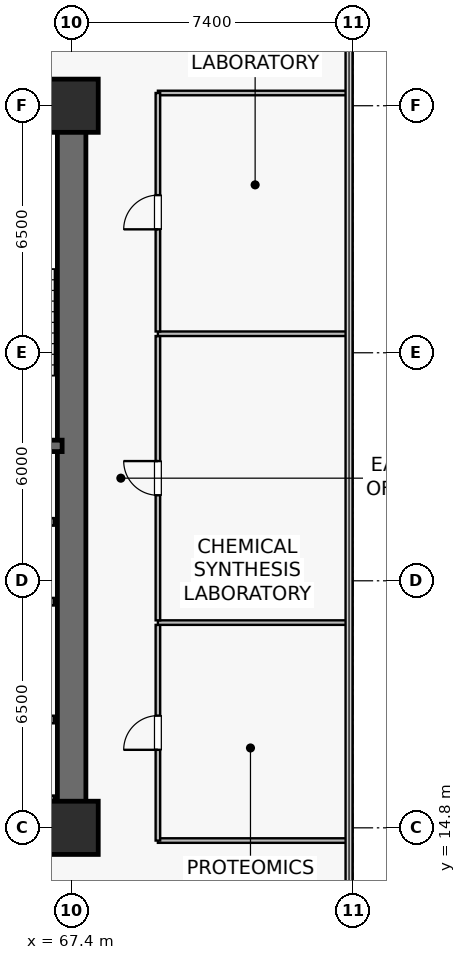
"""IFC4 building model, lengths in metres.
Left out: names, types, materials, properties, quantities, classifications, styles, units other than length and angle.
Written with IfcOpenShell. Run it as: python <this file> out.ifc"""

import sys

from ifc_helpers import new_model, si_unit, direction, frame, frame_2d, origin, origin_2d, place, context, subcontext, project, spatial, rectangle, extrude, source, transform, mapped, element, fill, save


model = new_model("IFC4")
c1 = context("Model", 3, precision=1e-05, world=origin(), true_north=direction((0.0, 1.0)))
c2 = subcontext(c1, "Body", "Model", "MODEL_VIEW")
j1 = project(units=[si_unit("LENGTHUNIT", "METRE"), si_unit("PLANEANGLEUNIT", "RADIAN")], contexts=[c1])
p1 = place(None, origin())
s1 = spatial("IfcSite", under=j1, at=p1, CompositionType="ELEMENT")
p2 = place(p1, origin())
s2 = spatial("IfcBuilding", under=s1, at=p2, CompositionType="ELEMENT")
p3 = place(p2, frame((0.0, 0.0, 86.7)))
s3 = spatial("IfcBuildingStorey", under=s2, at=p3, CompositionType="ELEMENT", Elevation=86.7)
p4 = place(p3, frame((52.225, 14.8, 0.0), z_axis=(0.0, 0.0, 1.0), x_axis=(1.0, 0.0, 0.0)))
e1 = element("IfcWall", 1, at=p4, inside=s3, PredefinedType="SHEAR", context=c2, shape_type="SweptSolid", body=[
    extrude(rectangle(XDim=15.55, YDim=0.75, at=frame_2d((7.775, 0.0))), origin(), (0.0, 0.0, 1.0), 3.78),
])
p5 = place(p3, frame((52.225, 33.8, 0.0), z_axis=(0.0, 0.0, 1.0), x_axis=(1.0, 0.0, 0.0)))
e2 = element("IfcWall", 2, at=p5, inside=s3, PredefinedType="SHEAR", context=c2, shape_type="SweptSolid", body=[
    extrude(rectangle(XDim=15.55, YDim=0.75, at=frame_2d((7.775, 0.0))), origin(), (0.0, 0.0, 1.0), 3.78),
])
p6 = place(p5, frame((6.175, 0.0, 0.0)))
e3 = element("IfcOpeningElement", 3, at=p6, cuts=e2, PredefinedType="OPENING", context=c2, shape_type="SweptSolid", body=[
    extrude(rectangle(XDim=0.95, YDim=2.15, at=frame_2d((0.475, 1.075))), frame((0.0, 0.385, 0.0), z_axis=(0.0, -1.0, 0.0), x_axis=(1.0, 0.0, 0.0)), (0.0, 0.0, 1.0), 0.77),
])
p7 = place(p5, frame((2.635, 0.0, 0.0)))
e4 = element("IfcOpeningElement", 4, at=p7, cuts=e2, PredefinedType="OPENING", context=c2, shape_type="SweptSolid", body=[
    extrude(rectangle(XDim=0.95, YDim=2.15, at=frame_2d((0.475, 1.075))), frame((0.0, 0.385, 0.0), z_axis=(0.0, -1.0, 0.0), x_axis=(1.0, 0.0, 0.0)), (0.0, 0.0, 1.0), 0.77),
])
p8 = place(p3, frame((67.4, 15.175, 0.0), z_axis=(0.0, 0.0, 1.0), x_axis=(0.0, 1.0, 0.0)))
e5 = element("IfcWall", 5, at=p8, inside=s3, PredefinedType="SHEAR", context=c2, shape_type="SweptSolid", body=[
    extrude(rectangle(XDim=18.25, YDim=0.75, at=frame_2d((9.125, 0.0))), origin(), (0.0, 0.0, 1.0), 3.78),
])
p9 = place(p3, frame((63.35, 24.85, 0.0), z_axis=(0.0, 0.0, 1.0), x_axis=(1.0, 0.0, 0.0)))
e6 = element("IfcWall", 6, at=p9, inside=s3, PredefinedType="SHEAR", context=c2, shape_type="SweptSolid", body=[
    extrude(rectangle(XDim=3.8, YDim=0.3, at=frame_2d((1.9, 0.0))), origin(), (0.0, 0.0, 1.0), 3.78),
])
p10 = place(p3, frame((63.35, 33.4, 0.0), z_axis=(0.0, 0.0, 1.0), x_axis=(1.0, 0.0, 0.0)))
e7 = element("IfcWall", 7, at=p10, inside=s3, PredefinedType="SOLIDWALL", context=c2, shape_type="SweptSolid", body=[
    extrude(rectangle(XDim=3.72, YDim=0.12, at=frame_2d((1.86, 0.0))), origin(), (0.0, 0.0, 1.0), 3.78),
])
m1 = source(origin(), c2, "Body", "SweptSolid", [
    extrude(rectangle(XDim=1.4, YDim=1.4, at=origin_2d()), origin(), (0.0, 0.0, 1.0), 4.1),
])
for number, where, z_axis, x_axis in (
    (8, (67.4, 14.8, 0.0), (0.0, 0.0, 1.0), (1.0, 0.0, 0.0)),
    (9, (67.4, 33.8, 0.0), (0.0, 0.0, 1.0), (1.0, 0.0, 0.0)),
):
    element("IfcColumn", number, at=place(p3, frame(where, z_axis=z_axis, x_axis=x_axis)), inside=s3, PredefinedType="COLUMN", context=c2, shape_type="MappedRepresentation", body=[
        mapped(m1, transform((0.0, 0.0, 0.0), scale=1.0)),
    ])
p11 = place(p3, frame((64.67, 17.65, 0.0), z_axis=(0.0, 0.0, 1.0), x_axis=(1.0, 0.0, 0.0)))
e10 = element("IfcWall", 10, at=p11, inside=s3, PredefinedType="SOLIDWALL", context=c2, shape_type="SweptSolid", body=[
    extrude(rectangle(XDim=2.26, YDim=0.2, at=frame_2d((1.13, 0.0))), origin(), (0.0, 0.0, 1.0), 3.78),
])
p12 = place(p11, frame((0.58, 0.0, 0.0)))
e11 = element("IfcOpeningElement", 11, at=p12, cuts=e10, PredefinedType="OPENING", context=c2, shape_type="SweptSolid", body=[
    extrude(rectangle(XDim=1.1, YDim=2.22, at=frame_2d((0.55, 1.11))), frame((0.0, 0.11, 0.0), z_axis=(0.0, -1.0, 0.0), x_axis=(1.0, 0.0, 0.0)), (0.0, 0.0, 1.0), 0.22),
])
for number, where, z_axis, x_axis in (
    (12, (64.67, 15.55, 0.0), (0.0, 0.0, 1.0), (1.0, 0.0, 0.0)),
    (13, (64.67, 20.75, 0.0), (0.0, 0.0, 1.0), (1.0, 0.0, 0.0)),
    (14, (64.67, 22.85, 0.0), (0.0, 0.0, 1.0), (1.0, 0.0, 0.0)),
):
    element("IfcWall", number, at=place(p3, frame(where, z_axis=z_axis, x_axis=x_axis)), inside=s3, PredefinedType="SOLIDWALL", context=c2, shape_type="SweptSolid", body=[
        extrude(rectangle(XDim=2.26, YDim=0.2, at=frame_2d((1.13, 0.0))), origin(), (0.0, 0.0, 1.0), 3.78),
    ])
for number, where, z_axis, x_axis in (
    (15, (69.67, 14.465, 0.0), (0.0, 0.0, 1.0), (1.0, 0.0, 0.0)),
    (16, (69.67, 34.135, 0.0), (0.0, 0.0, 1.0), (1.0, 0.0, 0.0)),
):
    element("IfcWall", number, at=place(p3, frame(where, z_axis=z_axis, x_axis=x_axis)), inside=s3, PredefinedType="PARTITIONING", context=c2, shape_type="SweptSolid", body=[
        extrude(rectangle(XDim=5.02, YDim=0.12, at=frame_2d((2.51, 0.0))), origin(), (0.0, 0.0, 1.0), 3.78),
    ])
p13 = place(p3, frame((69.67, 14.465, 0.0), z_axis=(0.0, 0.0, 1.0), x_axis=(0.0, 1.0, 0.0)))
e17 = element("IfcWall", 17, at=p13, inside=s3, PredefinedType="PARTITIONING", context=c2, shape_type="SweptSolid", body=[
    extrude(rectangle(XDim=5.675, YDim=0.12, at=frame_2d((2.837, 0.0))), origin(), (0.0, 0.0, 1.0), 3.78),
])
p14 = place(p13, frame((2.387, 0.0, 0.0)))
e18 = element("IfcOpeningElement", 18, at=p14, cuts=e17, PredefinedType="OPENING", context=c2, shape_type="SweptSolid", body=[
    extrude(rectangle(XDim=0.9, YDim=2.1, at=frame_2d((0.45, 1.05))), frame((0.0, 0.07, 0.0), z_axis=(0.0, -1.0, 0.0), x_axis=(1.0, 0.0, 0.0)), (0.0, 0.0, 1.0), 0.14),
])
p15 = place(p3, frame((69.67, 20.2, 0.0), z_axis=(0.0, 0.0, 1.0), x_axis=(1.0, 0.0, 0.0)))
e19 = element("IfcWall", 19, at=p15, inside=s3, PredefinedType="PARTITIONING", context=c2, shape_type="SweptSolid", body=[
    extrude(rectangle(XDim=5.02, YDim=0.12, at=frame_2d((2.51, 0.0))), origin(), (0.0, 0.0, 1.0), 3.78),
])
p16 = place(p3, frame((69.67, 20.26, 0.0), z_axis=(0.0, 0.0, 1.0), x_axis=(0.0, 1.0, 0.0)))
e20 = element("IfcWall", 20, at=p16, inside=s3, PredefinedType="PARTITIONING", context=c2, shape_type="SweptSolid", body=[
    extrude(rectangle(XDim=7.48, YDim=0.12, at=frame_2d((3.74, 0.0))), origin(), (0.0, 0.0, 1.0), 3.78),
])
p17 = place(p16, frame((3.29, 0.0, 0.0)))
e21 = element("IfcOpeningElement", 21, at=p17, cuts=e20, PredefinedType="OPENING", context=c2, shape_type="SweptSolid", body=[
    extrude(rectangle(XDim=0.9, YDim=2.1, at=frame_2d((0.45, 1.05))), frame((0.0, 0.07, 0.0), z_axis=(0.0, -1.0, 0.0), x_axis=(1.0, 0.0, 0.0)), (0.0, 0.0, 1.0), 0.14),
])
p18 = place(p3, frame((69.67, 27.8, 0.0), z_axis=(0.0, 0.0, 1.0), x_axis=(1.0, 0.0, 0.0)))
e22 = element("IfcWall", 22, at=p18, inside=s3, PredefinedType="PARTITIONING", context=c2, shape_type="SweptSolid", body=[
    extrude(rectangle(XDim=5.02, YDim=0.12, at=frame_2d((2.51, 0.0))), origin(), (0.0, 0.0, 1.0), 3.78),
])
p19 = place(p3, frame((69.67, 27.86, 0.0), z_axis=(0.0, 0.0, 1.0), x_axis=(0.0, 1.0, 0.0)))
e23 = element("IfcWall", 23, at=p19, inside=s3, PredefinedType="PARTITIONING", context=c2, shape_type="SweptSolid", body=[
    extrude(rectangle(XDim=6.275, YDim=0.12, at=frame_2d((3.137, 0.0))), origin(), (0.0, 0.0, 1.0), 3.78),
])
p20 = place(p19, frame((2.688, 0.0, 0.0)))
e24 = element("IfcOpeningElement", 24, at=p20, cuts=e23, PredefinedType="OPENING", context=c2, shape_type="SweptSolid", body=[
    extrude(rectangle(XDim=0.9, YDim=2.1, at=frame_2d((0.45, 1.05))), frame((0.0, 0.07, 0.0), z_axis=(0.0, -1.0, 0.0), x_axis=(1.0, 0.0, 0.0)), (0.0, 0.0, 1.0), 0.14),
])
m2 = source(origin(), c2, "Body", "SweptSolid", [
    extrude(rectangle(XDim=0.9, YDim=2.1, at=frame_2d((0.45, 1.05))), frame((0.0, 0.025, 0.0), z_axis=(0.0, -1.0, 0.0), x_axis=(1.0, 0.0, 0.0)), (0.0, 0.0, 1.0), 0.05),
])
p21 = place(p14, origin())
e25 = element("IfcDoor", 25, at=p21, inside=s3, OperationType="SINGLE_SWING_LEFT", PredefinedType="DOOR", context=c2, shape_type="MappedRepresentation", body=[
    mapped(m2, transform((0.0, 0.0, 0.0), scale=1.0)),
])
fill(e18, e25)
p22 = place(p17, origin())
e26 = element("IfcDoor", 26, at=p22, inside=s3, OperationType="SINGLE_SWING_RIGHT", PredefinedType="DOOR", context=c2, shape_type="MappedRepresentation", body=[
    mapped(m2, transform((0.0, 0.0, 0.0), scale=1.0)),
])
fill(e21, e26)
p23 = place(p20, origin())
e27 = element("IfcDoor", 27, at=p23, inside=s3, OperationType="SINGLE_SWING_LEFT", PredefinedType="DOOR", context=c2, shape_type="MappedRepresentation", body=[
    mapped(m2, transform((0.0, 0.0, 0.0), scale=1.0)),
])
fill(e24, e27)
save(model, sys.argv[1])
